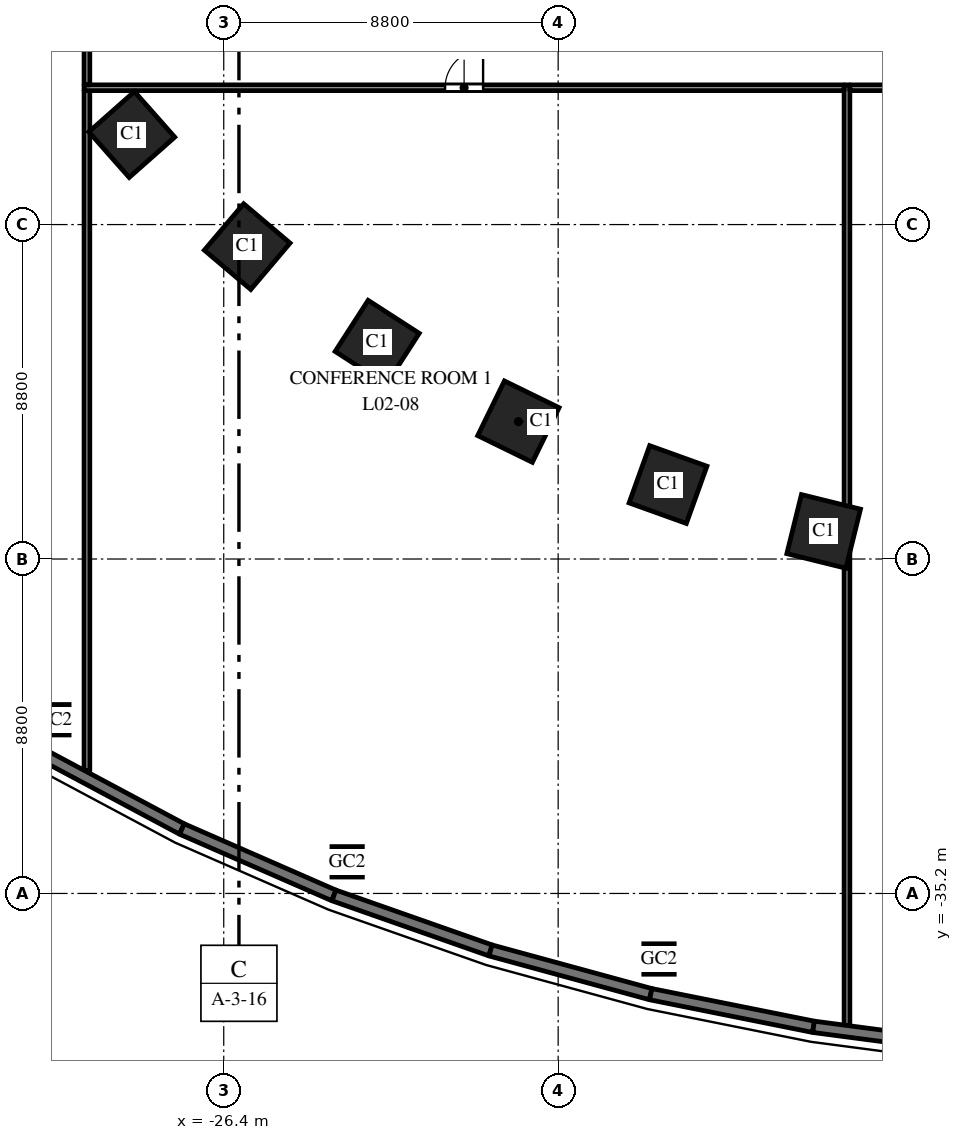
"""IFC4 building model, lengths in metres.
Left out: names, types, materials, properties, quantities, classifications, styles, units other than length and angle.
Written with IfcOpenShell. Run it as: python <this file> out.ifc"""

import sys

from ifc_helpers import new_model, si_unit, direction, frame, frame_2d, origin, origin_2d, place, context, subcontext, project, spatial, rectangle, hollow_rectangle, extrude, element, fill, save


model = new_model("IFC4")
c1 = context("Model", 3, precision=1e-05, world=origin(), true_north=direction((0.0, 1.0)))
c2 = subcontext(c1, "Body", "Model", "MODEL_VIEW")
j1 = project(units=[si_unit("LENGTHUNIT", "METRE"), si_unit("PLANEANGLEUNIT", "RADIAN")], contexts=[c1])
p1 = place(None, origin())
s1 = spatial("IfcSite", under=j1, at=p1, CompositionType="ELEMENT")
p2 = place(p1, origin())
s2 = spatial("IfcBuilding", under=s1, at=p2, CompositionType="ELEMENT")
p3 = place(p2, frame((0.0, 0.0, 13.5)))
s3 = spatial("IfcBuildingStorey", under=s2, at=p3, CompositionType="ELEMENT", Elevation=13.5)
for number, where, z_axis, x_axis in (
    (1, (-28.819, -15.23, 0.0), (0.0, 0.0, 1.0), (0.663, -0.749, 0.0)),
    (2, (-25.783, -18.18, 0.0), (0.0, 0.0, 1.0), (0.763, -0.646, 0.0)),
    (3, (-22.362, -20.7, 0.0), (0.0, 0.0, 1.0), (0.84, -0.542, 0.0)),
    (4, (-18.646, -22.785, 0.0), (0.0, 0.0, 1.0), (0.898, -0.439, 0.0)),
    (5, (-14.709, -24.441, 0.0), (0.0, 0.0, 1.0), (0.941, -0.338, 0.0)),
    (6, (-10.613, -25.674, 0.0), (0.0, 0.0, 1.0), (0.971, -0.24, 0.0)),
):
    element("IfcColumn", number, at=place(p3, frame(where, z_axis=z_axis, x_axis=x_axis)), inside=s3, PredefinedType="COLUMN", context=c2, shape_type="SweptSolid", body=[
        extrude(rectangle(XDim=1.6, YDim=1.6, at=origin_2d()), origin(), (0.0, 0.0, 1.0), 6.0),
    ])
for number, where, z_axis, x_axis in (
    (7, (-30.869, -30.629, 0.0), (0.0, 0.0, 1.0), (1.0, 0.0, 0.0)),
    (8, (-23.153, -34.368, 0.0), (0.0, 0.0, 1.0), (1.0, 0.0, 0.0)),
    (9, (-14.946, -36.925, 0.0), (0.0, 0.0, 1.0), (1.0, 0.0, 0.0)),
):
    element("IfcColumn", number, at=place(p3, frame(where, z_axis=z_axis, x_axis=x_axis)), inside=s3, PredefinedType="COLUMN", context=c2, shape_type="SweptSolid", body=[
        extrude(hollow_rectangle(XDim=0.8, YDim=0.8, WallThickness=0.04, at=origin_2d()), origin(), (0.0, 0.0, 1.0), 6.0),
    ])
p4 = place(p3, frame((-10.0, -13.925, 0.0), z_axis=(0.0, 0.0, 1.0), x_axis=(0.0, -1.0, 0.0)))
e10 = element("IfcWall", 10, at=p4, inside=s3, PredefinedType="PARTITIONING", context=c2, shape_type="SweptSolid", body=[
    extrude(rectangle(XDim=24.746, YDim=0.15, at=frame_2d((12.373, 0.0))), origin(), (0.0, 0.0, 1.0), 4.8),
])
p5 = place(p3, frame((-30.0, -31.97, 0.0), z_axis=(0.0, 0.0, 1.0), x_axis=(0.0, 1.0, 0.0)))
e11 = element("IfcWall", 11, at=p5, inside=s3, PredefinedType="PARTITIONING", context=c2, shape_type="SweptSolid", body=[
    extrude(rectangle(XDim=17.895, YDim=0.15, at=frame_2d((8.948, 0.0))), origin(), (0.0, 0.0, 1.0), 4.75),
])
p6 = place(p3, frame((-30.075, -14.0, 0.0), z_axis=(0.0, 0.0, 1.0), x_axis=(1.0, 0.0, 0.0)))
e12 = element("IfcWall", 12, at=p6, inside=s3, PredefinedType="PARTITIONING", context=c2, shape_type="SweptSolid", body=[
    extrude(rectangle(XDim=20.0, YDim=0.15, at=frame_2d((10.0, 0.0))), origin(), (0.0, 0.0, 1.0), 4.7),
])
p7 = place(p6, frame((9.5, 0.0, 0.0)))
e13 = element("IfcOpeningElement", 13, at=p7, cuts=e12, PredefinedType="OPENING", context=c2, shape_type="SweptSolid", body=[
    extrude(rectangle(XDim=1.0, YDim=2.1, at=frame_2d((0.5, 1.05))), frame((0.0, 0.085, 0.0), z_axis=(0.0, -1.0, 0.0), x_axis=(1.0, 0.0, 0.0)), (0.0, 0.0, 1.0), 0.17),
])
p8 = place(p3, frame((-9.925, -14.0, 0.0), z_axis=(0.0, 0.0, 1.0), x_axis=(1.0, 0.0, 0.0)))
e14 = element("IfcWall", 14, at=p8, inside=s3, PredefinedType="PARTITIONING", context=c2, shape_type="SweptSolid", body=[
    extrude(rectangle(XDim=19.85, YDim=0.15, at=frame_2d((9.925, 0.0))), origin(), (0.0, 0.0, 1.0), 4.8),
])
p9 = place(p8, frame((9.425, 0.0, 0.0)))
e15 = element("IfcOpeningElement", 15, at=p9, cuts=e14, PredefinedType="OPENING", context=c2, shape_type="SweptSolid", body=[
    extrude(rectangle(XDim=1.0, YDim=2.1, at=frame_2d((0.5, 1.05))), frame((0.0, 0.085, 0.0), z_axis=(0.0, -1.0, 0.0), x_axis=(1.0, 0.0, 0.0)), (0.0, 0.0, 1.0), 0.17),
])
p10 = place(p3, frame((-30.0, -12.075, 0.0), z_axis=(0.0, 0.0, 1.0), x_axis=(0.0, -1.0, 0.0)))
e16 = element("IfcWall", 16, at=p10, inside=s3, PredefinedType="PARTITIONING", context=c2, shape_type="SweptSolid", body=[
    extrude(rectangle(XDim=1.851, YDim=0.15, at=frame_2d((0.926, 0.0))), origin(), (0.0, 0.0, 1.0), 4.85),
])
p11 = place(p3, frame((-31.352, -31.448, 0.0), z_axis=(0.0, 0.0, 1.0), x_axis=(0.882159305704, -0.47095112205, 0.0)))
e17 = element("IfcWall", 17, at=p11, inside=s3, PredefinedType="SOLIDWALL", context=c2, shape_type="SweptSolid", body=[
    extrude(rectangle(XDim=4.365, YDim=0.3, at=frame_2d((2.182, 0.0))), origin(), (0.0, 0.0, 1.0), 5.75),
])
p12 = place(p11, frame((1.622, 0.0, 1.0)))
e18 = element("IfcOpeningElement", 18, at=p12, cuts=e17, PredefinedType="OPENING", context=c2, shape_type="SweptSolid", body=[
    extrude(rectangle(XDim=2.4, YDim=3.0, at=frame_2d((1.2, 1.5))), frame((0.0, 0.16, 0.0), z_axis=(0.0, -1.0, 0.0), x_axis=(1.0, 0.0, 0.0)), (0.0, 0.0, 1.0), 0.32),
])
p13 = place(p3, frame((-27.501, -33.504, 0.0), z_axis=(0.0, 0.0, 1.0), x_axis=(0.916336904548, -0.400408138483, 0.0)))
e19 = element("IfcWall", 19, at=p13, inside=s3, PredefinedType="SOLIDWALL", context=c2, shape_type="SweptSolid", body=[
    extrude(rectangle(XDim=4.366, YDim=0.3, at=frame_2d((2.183, 0.0))), origin(), (0.0, 0.0, 1.0), 5.75),
])
p14 = place(p13, frame((0.983, 0.0, 1.0)))
e20 = element("IfcOpeningElement", 20, at=p14, cuts=e19, PredefinedType="OPENING", context=c2, shape_type="SweptSolid", body=[
    extrude(rectangle(XDim=2.4, YDim=3.0, at=frame_2d((1.2, 1.5))), frame((0.0, 0.16, 0.0), z_axis=(0.0, -1.0, 0.0), x_axis=(1.0, 0.0, 0.0)), (0.0, 0.0, 1.0), 0.32),
])
p15 = place(p3, frame((-23.5, -35.252, 0.0), z_axis=(0.0, 0.0, 1.0), x_axis=(0.943526738033, -0.331296384853, 0.0)))
e21 = element("IfcWall", 21, at=p15, inside=s3, PredefinedType="SOLIDWALL", context=c2, shape_type="SweptSolid", body=[
    extrude(rectangle(XDim=4.368, YDim=0.3, at=frame_2d((2.184, 0.0))), origin(), (0.0, 0.0, 1.0), 5.75),
])
p16 = place(p15, frame((0.984, 0.0, 1.0)))
e22 = element("IfcOpeningElement", 22, at=p16, cuts=e21, PredefinedType="OPENING", context=c2, shape_type="SweptSolid", body=[
    extrude(rectangle(XDim=2.4, YDim=3.0, at=frame_2d((1.2, 1.5))), frame((0.0, 0.16, 0.0), z_axis=(0.0, -1.0, 0.0), x_axis=(1.0, 0.0, 0.0)), (0.0, 0.0, 1.0), 0.32),
])
p17 = place(p3, frame((-19.379, -36.699, 0.0), z_axis=(0.0, 0.0, 1.0), x_axis=(0.964679950239, -0.263424739931, 0.0)))
e23 = element("IfcWall", 23, at=p17, inside=s3, PredefinedType="SOLIDWALL", context=c2, shape_type="SweptSolid", body=[
    extrude(rectangle(XDim=4.369, YDim=0.3, at=frame_2d((2.185, 0.0))), origin(), (0.0, 0.0, 1.0), 5.75),
])
p18 = place(p17, frame((0.985, 0.0, 1.0)))
e24 = element("IfcOpeningElement", 24, at=p18, cuts=e23, PredefinedType="OPENING", context=c2, shape_type="SweptSolid", body=[
    extrude(rectangle(XDim=2.4, YDim=3.0, at=frame_2d((1.2, 1.5))), frame((0.0, 0.16, 0.0), z_axis=(0.0, -1.0, 0.0), x_axis=(1.0, 0.0, 0.0)), (0.0, 0.0, 1.0), 0.32),
])
p19 = place(p3, frame((-15.165, -37.85, 0.0), z_axis=(0.0, 0.0, 1.0), x_axis=(0.980494629762, -0.196545875071, 0.0)))
e25 = element("IfcWall", 25, at=p19, inside=s3, PredefinedType="SOLIDWALL", context=c2, shape_type="SweptSolid", body=[
    extrude(rectangle(XDim=4.37, YDim=0.3, at=frame_2d((2.185, 0.0))), origin(), (0.0, 0.0, 1.0), 5.75),
])
p20 = place(p19, frame((0.985, 0.0, 1.0)))
e26 = element("IfcOpeningElement", 26, at=p20, cuts=e25, PredefinedType="OPENING", context=c2, shape_type="SweptSolid", body=[
    extrude(rectangle(XDim=2.4, YDim=3.0, at=frame_2d((1.2, 1.5))), frame((0.0, 0.16, 0.0), z_axis=(0.0, -1.0, 0.0), x_axis=(1.0, 0.0, 0.0)), (0.0, 0.0, 1.0), 0.32),
])
p21 = place(p3, frame((-10.88, -38.709, 0.0), z_axis=(0.0, 0.0, 1.0), x_axis=(0.991441741932, -0.130549884544, 0.0)))
e27 = element("IfcWall", 27, at=p21, inside=s3, PredefinedType="SOLIDWALL", context=c2, shape_type="SweptSolid", body=[
    extrude(rectangle(XDim=4.37, YDim=0.3, at=frame_2d((2.185, 0.0))), origin(), (0.0, 0.0, 1.0), 5.75),
])
p22 = place(p21, frame((1.045, 0.0, 1.0)))
e28 = element("IfcOpeningElement", 28, at=p22, cuts=e27, PredefinedType="OPENING", context=c2, shape_type="SweptSolid", body=[
    extrude(rectangle(XDim=2.4, YDim=3.0, at=frame_2d((1.2, 1.5))), frame((0.0, 0.16, 0.0), z_axis=(0.0, -1.0, 0.0), x_axis=(1.0, 0.0, 0.0)), (0.0, 0.0, 1.0), 0.32),
])
p23 = place(p7, origin())
e29 = element("IfcDoor", 29, at=p23, inside=s3, OperationType="SINGLE_SWING_RIGHT", PredefinedType="DOOR", context=c2, shape_type="SweptSolid", body=[
    extrude(rectangle(XDim=1.0, YDim=2.1, at=frame_2d((0.5, 1.05))), frame((0.0, 0.025, 0.0), z_axis=(0.0, -1.0, 0.0), x_axis=(1.0, 0.0, 0.0)), (0.0, 0.0, 1.0), 0.05),
])
fill(e13, e29)
p24 = place(p12, origin())
e30 = element("IfcWindow", 30, at=p24, inside=s3, PartitioningType="SINGLE_PANEL", PredefinedType="WINDOW", context=c2, shape_type="SweptSolid", body=[
    extrude(rectangle(XDim=2.4, YDim=3.0, at=frame_2d((1.2, 1.5))), frame((0.0, 0.03, 0.0), z_axis=(0.0, -1.0, 0.0), x_axis=(1.0, 0.0, 0.0)), (0.0, 0.0, 1.0), 0.06),
])
fill(e18, e30)
p25 = place(p14, origin())
e31 = element("IfcWindow", 31, at=p25, inside=s3, PartitioningType="SINGLE_PANEL", PredefinedType="WINDOW", context=c2, shape_type="SweptSolid", body=[
    extrude(rectangle(XDim=2.4, YDim=3.0, at=frame_2d((1.2, 1.5))), frame((0.0, 0.03, 0.0), z_axis=(0.0, -1.0, 0.0), x_axis=(1.0, 0.0, 0.0)), (0.0, 0.0, 1.0), 0.06),
])
fill(e20, e31)
p26 = place(p16, origin())
e32 = element("IfcWindow", 32, at=p26, inside=s3, PartitioningType="SINGLE_PANEL", PredefinedType="WINDOW", context=c2, shape_type="SweptSolid", body=[
    extrude(rectangle(XDim=2.4, YDim=3.0, at=frame_2d((1.2, 1.5))), frame((0.0, 0.03, 0.0), z_axis=(0.0, -1.0, 0.0), x_axis=(1.0, 0.0, 0.0)), (0.0, 0.0, 1.0), 0.06),
])
fill(e22, e32)
p27 = place(p18, origin())
e33 = element("IfcWindow", 33, at=p27, inside=s3, PartitioningType="SINGLE_PANEL", PredefinedType="WINDOW", context=c2, shape_type="SweptSolid", body=[
    extrude(rectangle(XDim=2.4, YDim=3.0, at=frame_2d((1.2, 1.5))), frame((0.0, 0.03, 0.0), z_axis=(0.0, -1.0, 0.0), x_axis=(1.0, 0.0, 0.0)), (0.0, 0.0, 1.0), 0.06),
])
fill(e24, e33)
p28 = place(p20, origin())
e34 = element("IfcWindow", 34, at=p28, inside=s3, PartitioningType="SINGLE_PANEL", PredefinedType="WINDOW", context=c2, shape_type="SweptSolid", body=[
    extrude(rectangle(XDim=2.4, YDim=3.0, at=frame_2d((1.2, 1.5))), frame((0.0, 0.03, 0.0), z_axis=(0.0, -1.0, 0.0), x_axis=(1.0, 0.0, 0.0)), (0.0, 0.0, 1.0), 0.06),
])
fill(e26, e34)
p29 = place(p22, origin())
e35 = element("IfcWindow", 35, at=p29, inside=s3, PartitioningType="SINGLE_PANEL", PredefinedType="WINDOW", context=c2, shape_type="SweptSolid", body=[
    extrude(rectangle(XDim=2.4, YDim=3.0, at=frame_2d((1.2, 1.5))), frame((0.0, 0.03, 0.0), z_axis=(0.0, -1.0, 0.0), x_axis=(1.0, 0.0, 0.0)), (0.0, 0.0, 1.0), 0.06),
])
fill(e28, e35)
save(model, sys.argv[1])
